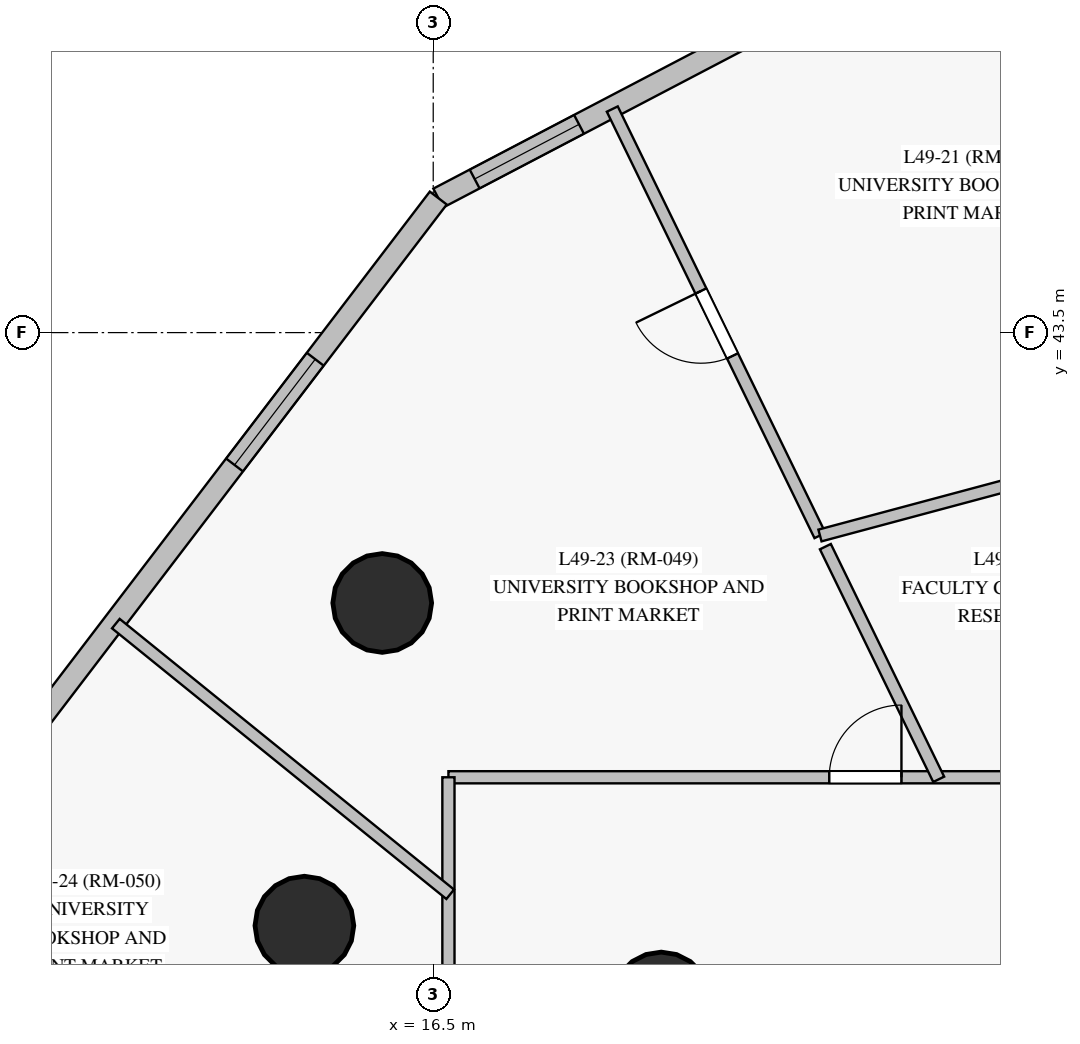
"""IFC4 building model, lengths in metres.
Left out: names, types, materials, properties, quantities, classifications, styles, units other than length and angle.
Written with IfcOpenShell. Run it as: python <this file> out.ifc"""

import sys

from ifc_helpers import new_model, si_unit, direction, frame, frame_2d, origin, origin_with_axes, origin_2d, place, context, subcontext, project, spatial, rectangle, circle, extrude, source, transform, mapped, element, fill, save


model = new_model("IFC4")
c1 = context("Model", 3, precision=1e-05, world=origin(), true_north=direction((0.0, 1.0)))
c2 = subcontext(c1, "Body", "Model", "MODEL_VIEW")
j1 = project(units=[si_unit("LENGTHUNIT", "METRE"), si_unit("PLANEANGLEUNIT", "RADIAN")], contexts=[c1])
p1 = place(None, origin())
s1 = spatial("IfcSite", under=j1, at=p1, CompositionType="ELEMENT")
p2 = place(p1, origin())
s2 = spatial("IfcBuilding", under=s1, at=p2, CompositionType="ELEMENT")
p3 = place(p2, frame((0.0, 0.0, 171.8)))
s3 = spatial("IfcBuildingStorey", under=s2, at=p3, CompositionType="ELEMENT", Elevation=171.8)
m1 = source(origin_with_axes(), c2, "Body", "SweptSolid", [
    extrude(circle(Radius=0.65, at=origin_2d()), origin(), (0.0, 0.0, 1.0), 3.05),
])
for number, where, z_axis, x_axis in (
    (1, (19.5, 34.7, 0.0), (0.0, 0.0, 1.0), (1.0, 0.0, 0.0)),
    (2, (15.829, 39.943, 0.0), (0.0, 0.0, 1.0), (1.0, 0.0, 0.0)),
    (3, (14.805, 35.698, 0.0), (0.0, 0.0, 1.0), (1.0, 0.0, 0.0)),
):
    element("IfcColumn", number, at=place(p3, frame(where, z_axis=z_axis, x_axis=x_axis)), inside=s3, PredefinedType="COLUMN", context=c2, shape_type="MappedRepresentation", body=[
        mapped(m1, transform((0.0, 0.0, 0.0), scale=1.0)),
    ])
p4 = place(p3, frame((25.232, 49.808, 0.0), z_axis=(0.0, 0.0, 1.0), x_axis=(-0.88587354348, -0.463926788364, 0.0)))
e4 = element("IfcWall", 4, at=p4, inside=s3, PredefinedType="SOLIDWALL", context=c2, shape_type="SweptSolid", body=[
    extrude(rectangle(XDim=9.782, YDim=0.28, at=frame_2d((4.891, 0.0))), origin(), (0.0, 0.0, 1.0), 2.825),
])
p5 = place(p4, frame((2.761, 0.0, 0.85)))
e5 = element("IfcOpeningElement", 5, at=p5, cuts=e4, PredefinedType="OPENING", context=c2, shape_type="SweptSolid", body=[
    extrude(rectangle(XDim=1.75, YDim=1.65, at=frame_2d((0.875, 0.825))), frame((0.0, 0.15, 0.0), z_axis=(0.0, -1.0, 0.0), x_axis=(1.0, 0.0, 0.0)), (0.0, 0.0, 1.0), 0.3),
])
p6 = place(p4, frame((7.692, 0.0, 0.85)))
e6 = element("IfcOpeningElement", 6, at=p6, cuts=e4, PredefinedType="OPENING", context=c2, shape_type="SweptSolid", body=[
    extrude(rectangle(XDim=1.55, YDim=1.65, at=frame_2d((0.775, 0.825))), frame((0.0, 0.15, 0.0), z_axis=(0.0, -1.0, 0.0), x_axis=(1.0, 0.0, 0.0)), (0.0, 0.0, 1.0), 0.3),
])
p7 = place(p3, frame((16.566, 45.27, 0.0), z_axis=(0.0, 0.0, 1.0), x_axis=(-0.606755233028, -0.794888726296, 0.0)))
e7 = element("IfcWall", 7, at=p7, inside=s3, PredefinedType="SOLIDWALL", context=c2, shape_type="SweptSolid", body=[
    extrude(rectangle(XDim=13.828, YDim=0.28, at=frame_2d((6.914, 0.0))), origin(), (0.0, 0.0, 1.0), 2.825),
])
p8 = place(p7, frame((2.667, 0.0, 0.85)))
e8 = element("IfcOpeningElement", 8, at=p8, cuts=e7, PredefinedType="OPENING", context=c2, shape_type="SweptSolid", body=[
    extrude(rectangle(XDim=1.75, YDim=1.65, at=frame_2d((0.875, 0.825))), frame((0.0, 0.15, 0.0), z_axis=(0.0, -1.0, 0.0), x_axis=(1.0, 0.0, 0.0)), (0.0, 0.0, 1.0), 0.3),
])
p9 = place(p7, frame((9.08, 0.0, 0.85)))
e9 = element("IfcOpeningElement", 9, at=p9, cuts=e7, PredefinedType="OPENING", context=c2, shape_type="SweptSolid", body=[
    extrude(rectangle(XDim=1.75, YDim=1.65, at=frame_2d((0.875, 0.825))), frame((0.0, 0.15, 0.0), z_axis=(0.0, -1.0, 0.0), x_axis=(1.0, 0.0, 0.0)), (0.0, 0.0, 1.0), 0.3),
])
p10 = place(p3, frame((16.7, 37.65, 0.0), z_axis=(0.0, 0.0, 1.0), x_axis=(1.0, 0.0, 0.0)))
e10 = element("IfcWall", 10, at=p10, inside=s3, PredefinedType="PARTITIONING", context=c2, shape_type="SweptSolid", body=[
    extrude(rectangle(XDim=23.5, YDim=0.16, at=frame_2d((11.75, 0.0))), origin(), (0.0, 0.0, 1.0), 2.375),
])
p11 = place(p10, frame((17.15, 0.0, 0.0)))
e11 = element("IfcOpeningElement", 11, at=p11, cuts=e10, PredefinedType="OPENING", context=c2, shape_type="SweptSolid", body=[
    extrude(rectangle(XDim=0.95, YDim=2.15, at=frame_2d((0.475, 1.075))), frame((0.0, 0.09, 0.0), z_axis=(0.0, -1.0, 0.0), x_axis=(1.0, 0.0, 0.0)), (0.0, 0.0, 1.0), 0.18),
])
p12 = place(p10, frame((14.31, 0.0, 0.0)))
e12 = element("IfcOpeningElement", 12, at=p12, cuts=e10, PredefinedType="OPENING", context=c2, shape_type="SweptSolid", body=[
    extrude(rectangle(XDim=0.95, YDim=2.15, at=frame_2d((0.475, 1.075))), frame((0.0, 0.09, 0.0), z_axis=(0.0, -1.0, 0.0), x_axis=(1.0, 0.0, 0.0)), (0.0, 0.0, 1.0), 0.18),
])
p13 = place(p10, frame((11.915, 0.0, 0.0)))
e13 = element("IfcOpeningElement", 13, at=p13, cuts=e10, PredefinedType="OPENING", context=c2, shape_type="SweptSolid", body=[
    extrude(rectangle(XDim=0.95, YDim=2.15, at=frame_2d((0.475, 1.075))), frame((0.0, 0.09, 0.0), z_axis=(0.0, -1.0, 0.0), x_axis=(1.0, 0.0, 0.0)), (0.0, 0.0, 1.0), 0.18),
])
p14 = place(p10, frame((7.75, 0.0, 0.0)))
e14 = element("IfcOpeningElement", 14, at=p14, cuts=e10, PredefinedType="OPENING", context=c2, shape_type="SweptSolid", body=[
    extrude(rectangle(XDim=0.95, YDim=2.15, at=frame_2d((0.475, 1.075))), frame((0.0, 0.09, 0.0), z_axis=(0.0, -1.0, 0.0), x_axis=(1.0, 0.0, 0.0)), (0.0, 0.0, 1.0), 0.18),
])
p15 = place(p10, frame((5.01, 0.0, 0.0)))
e15 = element("IfcOpeningElement", 15, at=p15, cuts=e10, PredefinedType="OPENING", context=c2, shape_type="SweptSolid", body=[
    extrude(rectangle(XDim=0.95, YDim=2.15, at=frame_2d((0.475, 1.075))), frame((0.0, 0.09, 0.0), z_axis=(0.0, -1.0, 0.0), x_axis=(1.0, 0.0, 0.0)), (0.0, 0.0, 1.0), 0.18),
])
p16 = place(p3, frame((16.7, 15.35, 0.0), z_axis=(0.0, 0.0, 1.0), x_axis=(0.0, 1.0, 0.0)))
e16 = element("IfcWall", 16, at=p16, inside=s3, PredefinedType="PARTITIONING", context=c2, shape_type="SweptSolid", body=[
    extrude(rectangle(XDim=22.3, YDim=0.16, at=frame_2d((11.15, 0.0))), origin(), (0.0, 0.0, 1.0), 2.275),
])
p17 = place(p16, frame((7.33, 0.0, 0.0)))
e17 = element("IfcOpeningElement", 17, at=p17, cuts=e16, PredefinedType="OPENING", context=c2, shape_type="SweptSolid", body=[
    extrude(rectangle(XDim=0.95, YDim=2.15, at=frame_2d((0.475, 1.075))), frame((0.0, 0.09, 0.0), z_axis=(0.0, -1.0, 0.0), x_axis=(1.0, 0.0, 0.0)), (0.0, 0.0, 1.0), 0.18),
])
p18 = place(p16, frame((5.1, 0.0, 0.0)))
e18 = element("IfcOpeningElement", 18, at=p18, cuts=e16, PredefinedType="OPENING", context=c2, shape_type="SweptSolid", body=[
    extrude(rectangle(XDim=0.96, YDim=2.15, at=frame_2d((0.48, 1.075))), frame((0.0, 0.09, 0.0), z_axis=(0.0, -1.0, 0.0), x_axis=(1.0, 0.0, 0.0)), (0.0, 0.0, 1.0), 0.18),
])
p19 = place(p16, frame((16.64, 0.0, 0.0)))
e19 = element("IfcOpeningElement", 19, at=p19, cuts=e16, PredefinedType="OPENING", context=c2, shape_type="SweptSolid", body=[
    extrude(rectangle(XDim=0.95, YDim=2.15, at=frame_2d((0.475, 1.075))), frame((0.0, 0.09, 0.0), z_axis=(0.0, -1.0, 0.0), x_axis=(1.0, 0.0, 0.0)), (0.0, 0.0, 1.0), 0.18),
])
p20 = place(p16, frame((11.215, 0.0, 0.0)))
e20 = element("IfcOpeningElement", 20, at=p20, cuts=e16, PredefinedType="OPENING", context=c2, shape_type="SweptSolid", body=[
    extrude(rectangle(XDim=0.95, YDim=2.15, at=frame_2d((0.475, 1.075))), frame((0.0, 0.09, 0.0), z_axis=(0.0, -1.0, 0.0), x_axis=(1.0, 0.0, 0.0)), (0.0, 0.0, 1.0), 0.18),
])
p21 = place(p3, frame((21.588, 40.831, 0.0), z_axis=(0.0, 0.0, 1.0), x_axis=(-0.437814557063, 0.899065299978, 0.0)))
e21 = element("IfcWall", 21, at=p21, inside=s3, PredefinedType="PARTITIONING", context=c2, shape_type="SweptSolid", body=[
    extrude(rectangle(XDim=6.24, YDim=0.16, at=frame_2d((3.12, 0.0))), origin(), (0.0, 0.0, 1.0), 2.825),
])
p22 = place(p21, frame((2.627, 0.0, 0.0)))
e22 = element("IfcOpeningElement", 22, at=p22, cuts=e21, PredefinedType="OPENING", context=c2, shape_type="SweptSolid", body=[
    extrude(rectangle(XDim=0.95, YDim=2.15, at=frame_2d((0.475, 1.075))), frame((0.0, 0.09, 0.0), z_axis=(0.0, -1.0, 0.0), x_axis=(1.0, 0.0, 0.0)), (0.0, 0.0, 1.0), 0.18),
])
p23 = place(p3, frame((16.723, 36.111, 0.0), z_axis=(0.0, 0.0, 1.0), x_axis=(-0.777265966674, 0.629172168051, 0.0)))
e23 = element("IfcWall", 23, at=p23, inside=s3, PredefinedType="PARTITIONING", context=c2, shape_type="SweptSolid", body=[
    extrude(rectangle(XDim=5.659, YDim=0.16, at=frame_2d((2.83, 0.0))), origin(), (0.0, 0.0, 1.0), 2.825),
])
p24 = place(p3, frame((26.861, 42.244, 0.0), z_axis=(0.0, 0.0, 1.0), x_axis=(-0.965933680277, -0.258789731841, 0.0)))
e24 = element("IfcWall", 24, at=p24, inside=s3, PredefinedType="PARTITIONING", context=c2, shape_type="SweptSolid", body=[
    extrude(rectangle(XDim=5.459, YDim=0.16, at=frame_2d((2.73, 0.0))), origin(), (0.0, 0.0, 1.0), 2.375),
])
p25 = place(p3, frame((23.15, 37.623, 0.0), z_axis=(0.0, 0.0, 1.0), x_axis=(-0.437810430728, 0.899067309352, 0.0)))
e25 = element("IfcWall", 25, at=p25, inside=s3, PredefinedType="PARTITIONING", context=c2, shape_type="SweptSolid", body=[
    extrude(rectangle(XDim=3.405, YDim=0.16, at=frame_2d((1.703, 0.0))), origin(), (0.0, 0.0, 1.0), 2.825),
])
m2 = source(origin_with_axes(), c2, "Body", "SweptSolid", [
    extrude(rectangle(XDim=1.55, YDim=1.65, at=frame_2d((0.775, 0.825))), frame((0.0, 0.03, 0.0), z_axis=(0.0, -1.0, 0.0), x_axis=(1.0, 0.0, 0.0)), (0.0, 0.0, 1.0), 0.06),
])
p26 = place(p6, origin())
e26 = element("IfcWindow", 26, at=p26, inside=s3, PartitioningType="SINGLE_PANEL", PredefinedType="WINDOW", context=c2, shape_type="MappedRepresentation", body=[
    mapped(m2, transform((0.0, 0.0, 0.0), scale=1.0)),
])
fill(e6, e26)
m3 = source(origin_with_axes(), c2, "Body", "SweptSolid", [
    extrude(rectangle(XDim=1.75, YDim=1.65, at=frame_2d((0.875, 0.825))), frame((0.0, 0.03, 0.0), z_axis=(0.0, -1.0, 0.0), x_axis=(1.0, 0.0, 0.0)), (0.0, 0.0, 1.0), 0.06),
])
p27 = place(p8, origin())
e27 = element("IfcWindow", 27, at=p27, inside=s3, PartitioningType="SINGLE_PANEL", PredefinedType="WINDOW", context=c2, shape_type="MappedRepresentation", body=[
    mapped(m3, transform((0.0, 0.0, 0.0), scale=1.0)),
])
fill(e8, e27)
m4 = source(origin_with_axes(), c2, "Body", "SweptSolid", [
    extrude(rectangle(XDim=0.95, YDim=2.15, at=frame_2d((0.475, 1.075))), frame((0.0, 0.025, 0.0), z_axis=(0.0, -1.0, 0.0), x_axis=(1.0, 0.0, 0.0)), (0.0, 0.0, 1.0), 0.05),
])
p28 = place(p15, origin())
e28 = element("IfcDoor", 28, at=p28, inside=s3, OperationType="SINGLE_SWING_RIGHT", PredefinedType="DOOR", context=c2, shape_type="MappedRepresentation", body=[
    mapped(m4, transform((0.0, 0.0, 0.0), scale=1.0)),
])
fill(e15, e28)
p29 = place(p22, origin())
e29 = element("IfcDoor", 29, at=p29, inside=s3, OperationType="SINGLE_SWING_RIGHT", PredefinedType="DOOR", context=c2, shape_type="MappedRepresentation", body=[
    mapped(m4, transform((0.0, 0.0, 0.0), scale=1.0)),
])
fill(e22, e29)
save(model, sys.argv[1])
